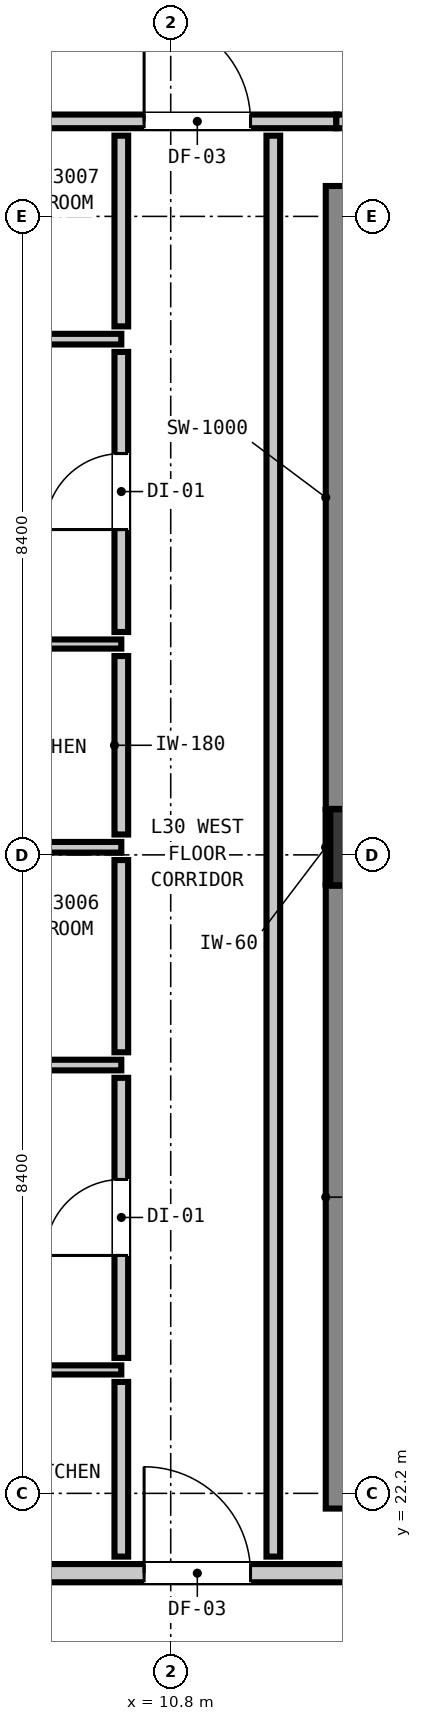
"""IFC4 building model, lengths in metres.
Left out: names, types, materials, properties, quantities, classifications, styles, units other than length and angle.
Written with IfcOpenShell. Run it as: python <this file> out.ifc"""

import sys

from ifc_helpers import new_model, si_unit, direction, frame, frame_2d, origin, origin_2d, place, context, subcontext, project, spatial, rectangle, extrude, element, fill, save


model = new_model("IFC4")
c1 = context("Model", 3, precision=1e-05, world=origin(), true_north=direction((0.0, 1.0)))
c2 = subcontext(c1, "Body", "Model", "MODEL_VIEW")
j1 = project(units=[si_unit("LENGTHUNIT", "METRE"), si_unit("PLANEANGLEUNIT", "RADIAN")], contexts=[c1])
p1 = place(None, origin())
s1 = spatial("IfcSite", under=j1, at=p1, CompositionType="ELEMENT")
p2 = place(p1, origin())
s2 = spatial("IfcBuilding", under=s1, at=p2, CompositionType="ELEMENT")
p3 = place(p2, frame((0.0, 0.0, 106.08)))
s3 = spatial("IfcBuildingStorey", under=s2, at=p3, CompositionType="ELEMENT", Elevation=106.08)
p4 = place(p3, frame((13.4, 30.7, 0.0), z_axis=(0.0, 0.0, 1.0), x_axis=(1.0, 0.0, 0.0)))
e1 = element("IfcColumn", 1, at=p4, inside=s3, PredefinedType="COLUMN", context=c2, shape_type="SweptSolid", body=[
    extrude(rectangle(XDim=1.0, YDim=1.0, at=origin_2d()), origin(), (0.0, 0.0, 1.0), 3.32),
])
p5 = place(p3, frame((13.34, 22.0, 0.0), z_axis=(0.0, 0.0, 1.0), x_axis=(0.0, 1.0, 0.0)))
e2 = element("IfcWall", 2, at=p5, inside=s3, PredefinedType="SHEAR", context=c2, shape_type="SweptSolid", body=[
    extrude(rectangle(XDim=8.195, YDim=1.0, at=frame_2d((4.098, 0.0))), origin(), (0.0, 0.0, 1.0), 3.32),
])
p6 = place(p3, frame((13.34, 31.205, 0.0), z_axis=(0.0, 0.0, 1.0), x_axis=(0.0, 1.0, 0.0)))
e3 = element("IfcWall", 3, at=p6, inside=s3, PredefinedType="SHEAR", context=c2, shape_type="SweptSolid", body=[
    extrude(rectangle(XDim=8.195, YDim=1.0, at=frame_2d((4.097, 0.0))), origin(), (0.0, 0.0, 1.0), 3.32),
])
p7 = place(p3, frame((3.207, 21.15, 0.0), z_axis=(0.0, 0.0, 1.0), x_axis=(1.0, 0.0, 0.0)))
e4 = element("IfcWall", 4, at=p7, inside=s3, PredefinedType="PARTITIONING", context=c2, shape_type="SweptSolid", body=[
    extrude(rectangle(XDim=39.386, YDim=0.24, at=frame_2d((19.693, 0.0))), origin(), (0.0, 0.0, 1.0), 3.08),
])
p8 = place(p7, frame((15.003, 0.0, 0.0)))
e5 = element("IfcOpeningElement", 5, at=p8, cuts=e4, PredefinedType="OPENING", context=c2, shape_type="SweptSolid", body=[
    extrude(rectangle(XDim=1.1, YDim=2.15, at=frame_2d((0.55, 1.075))), frame((0.0, 0.13, 0.0), z_axis=(0.0, -1.0, 0.0), x_axis=(1.0, 0.0, 0.0)), (0.0, 0.0, 1.0), 0.26),
])
p9 = place(p7, frame((7.243, 0.0, 0.0)))
e6 = element("IfcOpeningElement", 6, at=p9, cuts=e4, PredefinedType="OPENING", context=c2, shape_type="SweptSolid", body=[
    extrude(rectangle(XDim=1.4, YDim=2.15, at=frame_2d((0.7, 1.075))), frame((0.0, 0.13, 0.0), z_axis=(0.0, -1.0, 0.0), x_axis=(1.0, 0.0, 0.0)), (0.0, 0.0, 1.0), 0.26),
])
p10 = place(p7, frame((34.843, 0.0, 0.0)))
e7 = element("IfcOpeningElement", 7, at=p10, cuts=e4, PredefinedType="OPENING", context=c2, shape_type="SweptSolid", body=[
    extrude(rectangle(XDim=1.4, YDim=2.15, at=frame_2d((0.7, 1.075))), frame((0.0, 0.13, 0.0), z_axis=(0.0, -1.0, 0.0), x_axis=(1.0, 0.0, 0.0)), (0.0, 0.0, 1.0), 0.26),
])
p11 = place(p3, frame((4.071, 40.25, 0.0), z_axis=(0.0, 0.0, 1.0), x_axis=(1.0, 0.0, 0.0)))
e8 = element("IfcWall", 8, at=p11, inside=s3, PredefinedType="PARTITIONING", context=c2, shape_type="SweptSolid", body=[
    extrude(rectangle(XDim=8.908, YDim=0.18, at=frame_2d((4.454, 0.0))), origin(), (0.0, 0.0, 1.0), 2.565),
])
p12 = place(p11, frame((6.379, 0.0, 0.0)))
e9 = element("IfcOpeningElement", 9, at=p12, cuts=e8, PredefinedType="OPENING", context=c2, shape_type="SweptSolid", body=[
    extrude(rectangle(XDim=1.4, YDim=2.15, at=frame_2d((0.7, 1.075))), frame((0.0, 0.1, 0.0), z_axis=(0.0, -1.0, 0.0), x_axis=(1.0, 0.0, 0.0)), (0.0, 0.0, 1.0), 0.2),
])
p13 = place(p3, frame((12.979, 40.25, 0.0), z_axis=(0.0, 0.0, 1.0), x_axis=(1.0, 0.0, 0.0)))
e10 = element("IfcWall", 10, at=p13, inside=s3, PredefinedType="PARTITIONING", context=c2, shape_type="SweptSolid", body=[
    extrude(rectangle(XDim=29.614, YDim=0.18, at=frame_2d((14.807, 0.0))), origin(), (0.0, 0.0, 1.0), 3.08),
])
p14 = place(p13, frame((4.456, 0.0, 0.0)))
e11 = element("IfcOpeningElement", 11, at=p14, cuts=e10, PredefinedType="OPENING", context=c2, shape_type="SweptSolid", body=[
    extrude(rectangle(XDim=1.4, YDim=2.15, at=frame_2d((0.7, 1.075))), frame((0.0, 0.1, 0.0), z_axis=(0.0, -1.0, 0.0), x_axis=(1.0, 0.0, 0.0)), (0.0, 0.0, 1.0), 0.2),
])
p15 = place(p13, frame((25.071, 0.0, 0.0)))
e12 = element("IfcOpeningElement", 12, at=p15, cuts=e10, PredefinedType="OPENING", context=c2, shape_type="SweptSolid", body=[
    extrude(rectangle(XDim=1.4, YDim=2.15, at=frame_2d((0.7, 1.075))), frame((0.0, 0.1, 0.0), z_axis=(0.0, -1.0, 0.0), x_axis=(1.0, 0.0, 0.0)), (0.0, 0.0, 1.0), 0.2),
])
p16 = place(p3, frame((3.207, 27.835, 0.0), z_axis=(0.0, 0.0, 1.0), x_axis=(1.0, 0.0, 0.0)))
e13 = element("IfcWall", 13, at=p16, inside=s3, PredefinedType="PARTITIONING", context=c2, shape_type="SweptSolid", body=[
    extrude(rectangle(XDim=6.943, YDim=0.14, at=frame_2d((3.471, 0.0))), origin(), (0.0, 0.0, 1.0), 3.08),
])
p17 = place(p16, frame((5.006, 0.0, 0.0)))
e14 = element("IfcOpeningElement", 14, at=p17, cuts=e13, PredefinedType="OPENING", context=c2, shape_type="SweptSolid", body=[
    extrude(rectangle(XDim=0.86, YDim=2.02, at=frame_2d((0.43, 1.01))), frame((0.0, 0.08, 0.0), z_axis=(0.0, -1.0, 0.0), x_axis=(1.0, 0.0, 0.0)), (0.0, 0.0, 1.0), 0.16),
])
p18 = place(p16, frame((1.537, 0.0, 0.0)))
e15 = element("IfcOpeningElement", 15, at=p18, cuts=e13, PredefinedType="OPENING", context=c2, shape_type="SweptSolid", body=[
    extrude(rectangle(XDim=0.9, YDim=2.1, at=frame_2d((0.45, 1.05))), frame((0.0, 0.08, 0.0), z_axis=(0.0, -1.0, 0.0), x_axis=(1.0, 0.0, 0.0)), (0.0, 0.0, 1.0), 0.16),
])
p19 = place(p3, frame((4.232, 30.7, 0.0), z_axis=(0.0, 0.0, 1.0), x_axis=(1.0, 0.0, 0.0)))
e16 = element("IfcWall", 16, at=p19, inside=s3, PredefinedType="PARTITIONING", context=c2, shape_type="SweptSolid", body=[
    extrude(rectangle(XDim=5.918, YDim=0.14, at=frame_2d((2.959, 0.0))), origin(), (0.0, 0.0, 1.0), 2.315),
])
p20 = place(p3, frame((3.207, 37.385, 0.0), z_axis=(0.0, 0.0, 1.0), x_axis=(1.0, 0.0, 0.0)))
e17 = element("IfcWall", 17, at=p20, inside=s3, PredefinedType="PARTITIONING", context=c2, shape_type="SweptSolid", body=[
    extrude(rectangle(XDim=6.943, YDim=0.14, at=frame_2d((3.471, 0.0))), origin(), (0.0, 0.0, 1.0), 3.08),
])
p21 = place(p20, frame((5.006, 0.0, 0.0)))
e18 = element("IfcOpeningElement", 18, at=p21, cuts=e17, PredefinedType="OPENING", context=c2, shape_type="SweptSolid", body=[
    extrude(rectangle(XDim=0.86, YDim=2.02, at=frame_2d((0.43, 1.01))), frame((0.0, 0.08, 0.0), z_axis=(0.0, -1.0, 0.0), x_axis=(1.0, 0.0, 0.0)), (0.0, 0.0, 1.0), 0.16),
])
p22 = place(p20, frame((1.537, 0.0, 0.0)))
e19 = element("IfcOpeningElement", 19, at=p22, cuts=e17, PredefinedType="OPENING", context=c2, shape_type="SweptSolid", body=[
    extrude(rectangle(XDim=0.9, YDim=2.1, at=frame_2d((0.45, 1.05))), frame((0.0, 0.08, 0.0), z_axis=(0.0, -1.0, 0.0), x_axis=(1.0, 0.0, 0.0)), (0.0, 0.0, 1.0), 0.16),
])
p23 = place(p3, frame((3.207, 23.824, 0.0), z_axis=(0.0, 0.0, 1.0), x_axis=(1.0, 0.0, 0.0)))
e20 = element("IfcWall", 20, at=p23, inside=s3, PredefinedType="PARTITIONING", context=c2, shape_type="SweptSolid", body=[
    extrude(rectangle(XDim=6.943, YDim=0.12, at=frame_2d((3.471, 0.0))), origin(), (0.0, 0.0, 1.0), 3.08),
])
p24 = place(p23, frame((3.018, 0.0, 0.0)))
e21 = element("IfcOpeningElement", 21, at=p24, cuts=e20, PredefinedType="OPENING", context=c2, shape_type="SweptSolid", body=[
    extrude(rectangle(XDim=0.9, YDim=2.1, at=frame_2d((0.45, 1.05))), frame((0.0, 0.07, 0.0), z_axis=(0.0, -1.0, 0.0), x_axis=(1.0, 0.0, 0.0)), (0.0, 0.0, 1.0), 0.14),
])
p25 = place(p3, frame((3.207, 33.374, 0.0), z_axis=(0.0, 0.0, 1.0), x_axis=(1.0, 0.0, 0.0)))
e22 = element("IfcWall", 22, at=p25, inside=s3, PredefinedType="PARTITIONING", context=c2, shape_type="SweptSolid", body=[
    extrude(rectangle(XDim=6.943, YDim=0.12, at=frame_2d((3.471, 0.0))), origin(), (0.0, 0.0, 1.0), 3.08),
])
p26 = place(p25, frame((3.018, 0.0, 0.0)))
e23 = element("IfcOpeningElement", 23, at=p26, cuts=e22, PredefinedType="OPENING", context=c2, shape_type="SweptSolid", body=[
    extrude(rectangle(XDim=0.9, YDim=2.1, at=frame_2d((0.45, 1.05))), frame((0.0, 0.07, 0.0), z_axis=(0.0, -1.0, 0.0), x_axis=(1.0, 0.0, 0.0)), (0.0, 0.0, 1.0), 0.14),
])
p27 = place(p3, frame((10.15, 21.368, 0.0), z_axis=(0.0, 0.0, 1.0), x_axis=(0.0, 1.0, 0.0)))
e24 = element("IfcWall", 24, at=p27, inside=s3, PredefinedType="PARTITIONING", context=c2, shape_type="SweptSolid", body=[
    extrude(rectangle(XDim=2.298, YDim=0.18, at=frame_2d((1.149, 0.0))), origin(), (0.0, 0.0, 1.0), 3.08),
])
p28 = place(p3, frame((10.15, 23.982, 0.0), z_axis=(0.0, 0.0, 1.0), x_axis=(0.0, 1.0, 0.0)))
e25 = element("IfcWall", 25, at=p28, inside=s3, PredefinedType="PARTITIONING", context=c2, shape_type="SweptSolid", body=[
    extrude(rectangle(XDim=3.685, YDim=0.18, at=frame_2d((1.843, 0.0))), origin(), (0.0, 0.0, 1.0), 3.08),
])
p29 = place(p28, frame((1.348, 0.0, 0.0)))
e26 = element("IfcOpeningElement", 26, at=p29, cuts=e25, PredefinedType="OPENING", context=c2, shape_type="SweptSolid", body=[
    extrude(rectangle(XDim=1.0, YDim=2.15, at=frame_2d((0.5, 1.075))), frame((0.0, 0.1, 0.0), z_axis=(0.0, -1.0, 0.0), x_axis=(1.0, 0.0, 0.0)), (0.0, 0.0, 1.0), 0.2),
])
p30 = place(p3, frame((10.15, 28.003, 0.0), z_axis=(0.0, 0.0, 1.0), x_axis=(0.0, 1.0, 0.0)))
e27 = element("IfcWall", 27, at=p30, inside=s3, PredefinedType="PARTITIONING", context=c2, shape_type="SweptSolid", body=[
    extrude(rectangle(XDim=2.529, YDim=0.18, at=frame_2d((1.265, 0.0))), origin(), (0.0, 0.0, 1.0), 3.08),
])
p31 = place(p3, frame((10.15, 30.868, 0.0), z_axis=(0.0, 0.0, 1.0), x_axis=(0.0, 1.0, 0.0)))
e28 = element("IfcWall", 28, at=p31, inside=s3, PredefinedType="PARTITIONING", context=c2, shape_type="SweptSolid", body=[
    extrude(rectangle(XDim=2.348, YDim=0.18, at=frame_2d((1.174, 0.0))), origin(), (0.0, 0.0, 1.0), 3.08),
])
p32 = place(p3, frame((10.15, 33.532, 0.0), z_axis=(0.0, 0.0, 1.0), x_axis=(0.0, 1.0, 0.0)))
e29 = element("IfcWall", 29, at=p32, inside=s3, PredefinedType="PARTITIONING", context=c2, shape_type="SweptSolid", body=[
    extrude(rectangle(XDim=3.685, YDim=0.18, at=frame_2d((1.843, 0.0))), origin(), (0.0, 0.0, 1.0), 3.08),
])
p33 = place(p32, frame((1.348, 0.0, 0.0)))
e30 = element("IfcOpeningElement", 30, at=p33, cuts=e29, PredefinedType="OPENING", context=c2, shape_type="SweptSolid", body=[
    extrude(rectangle(XDim=1.0, YDim=2.15, at=frame_2d((0.5, 1.075))), frame((0.0, 0.1, 0.0), z_axis=(0.0, -1.0, 0.0), x_axis=(1.0, 0.0, 0.0)), (0.0, 0.0, 1.0), 0.2),
])
p34 = place(p3, frame((10.15, 37.553, 0.0), z_axis=(0.0, 0.0, 1.0), x_axis=(0.0, 1.0, 0.0)))
e31 = element("IfcWall", 31, at=p34, inside=s3, PredefinedType="PARTITIONING", context=c2, shape_type="SweptSolid", body=[
    extrude(rectangle(XDim=2.509, YDim=0.18, at=frame_2d((1.254, 0.0))), origin(), (0.0, 0.0, 1.0), 3.08),
])
p35 = place(p3, frame((12.15, 21.368, 0.0), z_axis=(0.0, 0.0, 1.0), x_axis=(0.0, 1.0, 0.0)))
e32 = element("IfcWall", 32, at=p35, inside=s3, PredefinedType="PARTITIONING", context=c2, shape_type="SweptSolid", body=[
    extrude(rectangle(XDim=18.694, YDim=0.18, at=frame_2d((9.347, 0.0))), origin(), (0.0, 0.0, 1.0), 3.08),
])
p36 = place(p3, frame((12.868, 30.21, 0.0), z_axis=(0.0, 0.0, 1.0), x_axis=(0.0, 1.0, 0.0)))
e33 = element("IfcWall", 33, at=p36, inside=s3, PredefinedType="PARTITIONING", context=c2, shape_type="SweptSolid", body=[
    extrude(rectangle(XDim=0.98, YDim=0.06, at=frame_2d((0.49, 0.0))), origin(), (0.0, 0.0, 1.0), 1.45),
])
p37 = place(p9, origin())
e34 = element("IfcDoor", 34, at=p37, inside=s3, OperationType="SINGLE_SWING_LEFT", PredefinedType="DOOR", context=c2, shape_type="SweptSolid", body=[
    extrude(rectangle(XDim=1.4, YDim=2.15, at=frame_2d((0.7, 1.075))), frame((0.0, 0.025, 0.0), z_axis=(0.0, -1.0, 0.0), x_axis=(1.0, 0.0, 0.0)), (0.0, 0.0, 1.0), 0.05),
])
fill(e6, e34)
p38 = place(p12, origin())
e35 = element("IfcDoor", 35, at=p38, inside=s3, OperationType="SINGLE_SWING_LEFT", PredefinedType="DOOR", context=c2, shape_type="SweptSolid", body=[
    extrude(rectangle(XDim=1.4, YDim=2.15, at=frame_2d((0.7, 1.075))), frame((0.0, 0.025, 0.0), z_axis=(0.0, -1.0, 0.0), x_axis=(1.0, 0.0, 0.0)), (0.0, 0.0, 1.0), 0.05),
])
fill(e9, e35)
p39 = place(p29, origin())
e36 = element("IfcDoor", 36, at=p39, inside=s3, OperationType="SINGLE_SWING_LEFT", PredefinedType="DOOR", context=c2, shape_type="SweptSolid", body=[
    extrude(rectangle(XDim=1.0, YDim=2.15, at=frame_2d((0.5, 1.075))), frame((0.0, 0.025, 0.0), z_axis=(0.0, -1.0, 0.0), x_axis=(1.0, 0.0, 0.0)), (0.0, 0.0, 1.0), 0.05),
])
fill(e26, e36)
p40 = place(p33, origin())
e37 = element("IfcDoor", 37, at=p40, inside=s3, OperationType="SINGLE_SWING_LEFT", PredefinedType="DOOR", context=c2, shape_type="SweptSolid", body=[
    extrude(rectangle(XDim=1.0, YDim=2.15, at=frame_2d((0.5, 1.075))), frame((0.0, 0.025, 0.0), z_axis=(0.0, -1.0, 0.0), x_axis=(1.0, 0.0, 0.0)), (0.0, 0.0, 1.0), 0.05),
])
fill(e30, e37)
save(model, sys.argv[1])
